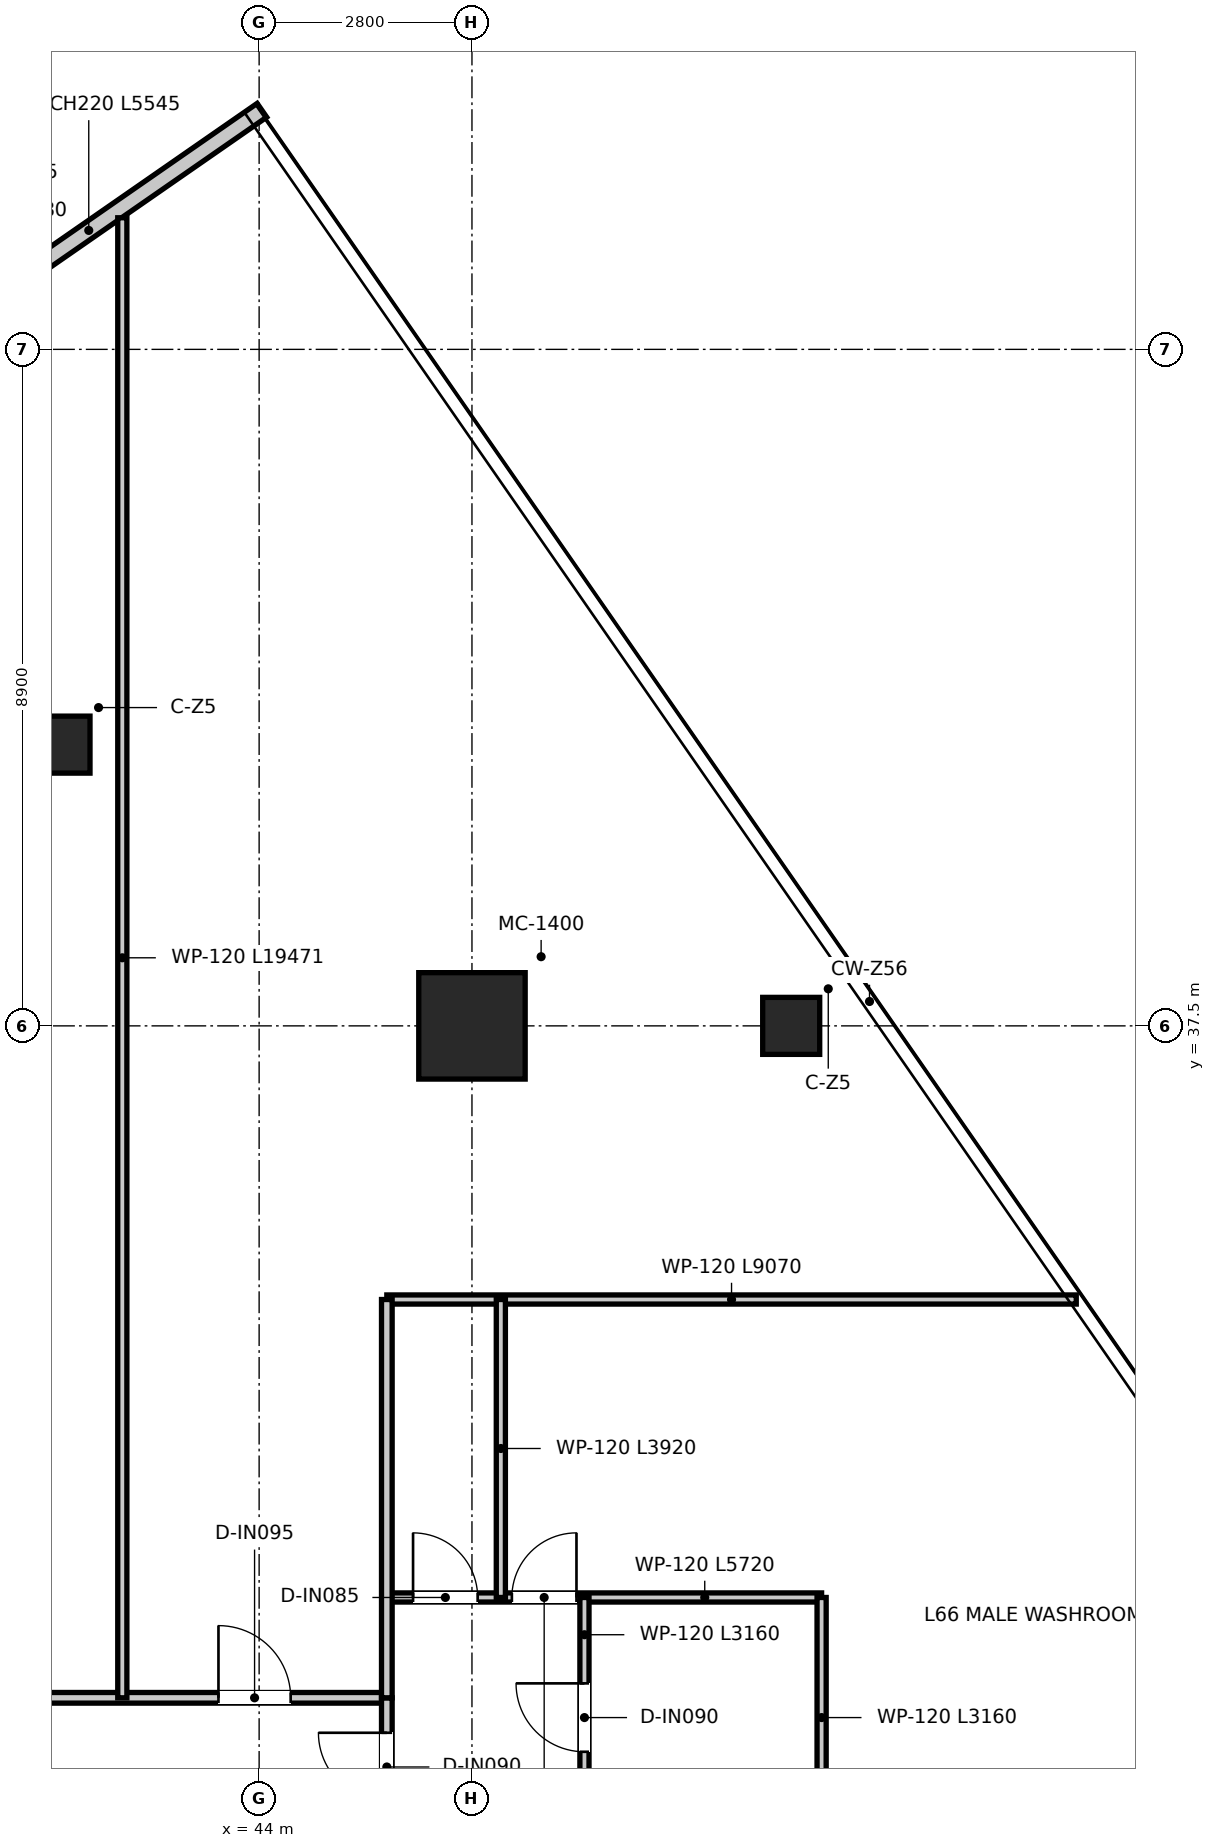
"""IFC4 building model, lengths in metres.
Left out: names, types, materials, properties, quantities, classifications, styles, units other than length and angle.
Written with IfcOpenShell. Run it as: python <this file> out.ifc"""

import sys

from ifc_helpers import new_model, si_unit, direction, frame, frame_2d, origin, origin_2d, place, context, subcontext, project, spatial, rectangle, extrude, source, transform, mapped, element, fill, save


model = new_model("IFC4")
c1 = context("Model", 3, precision=1e-05, world=origin(), true_north=direction((0.0, 1.0)))
c2 = subcontext(c1, "Body", "Model", "MODEL_VIEW")
j1 = project(units=[si_unit("LENGTHUNIT", "METRE"), si_unit("PLANEANGLEUNIT", "RADIAN")], contexts=[c1])
p1 = place(None, origin())
s1 = spatial("IfcSite", under=j1, at=p1, CompositionType="ELEMENT")
p2 = place(p1, origin())
s2 = spatial("IfcBuilding", under=s1, at=p2, CompositionType="ELEMENT")
p3 = place(p2, frame((0.0, 0.0, 271.35)))
s3 = spatial("IfcBuildingStorey", under=s2, at=p3, CompositionType="ELEMENT", Elevation=271.35)
m1 = source(origin(), c2, "Body", "SweptSolid", [
    extrude(rectangle(XDim=1.4, YDim=1.4, at=origin_2d()), origin(), (0.0, 0.0, 1.0), 3.95),
])
p4 = place(p3, frame((46.8, 37.5, 0.0), z_axis=(0.0, 0.0, 1.0), x_axis=(1.0, 0.0, 0.0)))
e1 = element("IfcColumn", 1, at=p4, inside=s3, PredefinedType="USERDEFINED", context=c2, shape_type="MappedRepresentation", body=[
    mapped(m1, transform((0.0, 0.0, 0.0), x_axis=(1.0, 0.0, 0.0), y_axis=(0.0, 1.0, 0.0), z_axis=(0.0, 0.0, 1.0), scale=1.0)),
])
m2 = source(origin(), c2, "Body", "SweptSolid", [
    extrude(rectangle(XDim=0.75, YDim=0.75, at=origin_2d()), origin(), (0.0, 0.0, 1.0), 3.95),
])
for number, where, z_axis, x_axis in (
    (2, (41.4, 41.2, 0.0), (0.0, 0.0, 1.0), (1.0, 0.0, 0.0)),
    (3, (51.0, 37.5, 0.0), (0.0, 0.0, 1.0), (1.0, 0.0, 0.0)),
):
    element("IfcColumn", number, at=place(p3, frame(where, z_axis=z_axis, x_axis=x_axis)), inside=s3, PredefinedType="COLUMN", context=c2, shape_type="MappedRepresentation", body=[
        mapped(m2, transform((0.0, 0.0, 0.0), x_axis=(1.0, 0.0, 0.0), y_axis=(0.0, 1.0, 0.0), z_axis=(0.0, 0.0, 1.0), scale=1.0)),
    ])
p5 = place(p3, frame((44.037, 49.545, 0.0), z_axis=(0.0, 0.0, 1.0), x_axis=(-0.821652918874, -0.569988141022, 0.0)))
e4 = element("IfcWall", 4, at=p5, inside=s3, PredefinedType="ELEMENTEDWALL", context=c2, shape_type="SweptSolid", body=[
    extrude(rectangle(XDim=5.545, YDim=0.22, at=frame_2d((2.772, 0.0))), origin(), (0.0, 0.0, 1.0), 3.67),
])
p6 = place(p3, frame((26.32, 28.66, 0.0), z_axis=(0.0, 0.0, 1.0), x_axis=(1.0, 0.0, 0.0)))
e5 = element("IfcWall", 5, at=p6, inside=s3, PredefinedType="PARTITIONING", context=c2, shape_type="SweptSolid", body=[
    extrude(rectangle(XDim=19.36, YDim=0.14, at=frame_2d((9.68, 0.0))), origin(), (0.0, 0.0, 1.0), 3.18),
])
p7 = place(p6, frame((1.265, 0.0, 0.0)))
e6 = element("IfcOpeningElement", 6, at=p7, cuts=e5, PredefinedType="OPENING", context=c2, shape_type="SweptSolid", body=[
    extrude(rectangle(XDim=0.95, YDim=2.1, at=frame_2d((0.475, 1.05))), frame((0.0, 0.08, 0.0), z_axis=(0.0, -1.0, 0.0), x_axis=(1.0, 0.0, 0.0)), (0.0, 0.0, 1.0), 0.16),
])
p8 = place(p6, frame((6.105, 0.0, 0.0)))
e7 = element("IfcOpeningElement", 7, at=p8, cuts=e5, PredefinedType="OPENING", context=c2, shape_type="SweptSolid", body=[
    extrude(rectangle(XDim=0.95, YDim=2.1, at=frame_2d((0.475, 1.05))), frame((0.0, 0.08, 0.0), z_axis=(0.0, -1.0, 0.0), x_axis=(1.0, 0.0, 0.0)), (0.0, 0.0, 1.0), 0.16),
])
p9 = place(p6, frame((12.305, 0.0, 0.0)))
e8 = element("IfcOpeningElement", 8, at=p9, cuts=e5, PredefinedType="OPENING", context=c2, shape_type="SweptSolid", body=[
    extrude(rectangle(XDim=0.95, YDim=2.1, at=frame_2d((0.475, 1.05))), frame((0.0, 0.08, 0.0), z_axis=(0.0, -1.0, 0.0), x_axis=(1.0, 0.0, 0.0)), (0.0, 0.0, 1.0), 0.16),
])
p10 = place(p6, frame((17.145, 0.0, 0.0)))
e9 = element("IfcOpeningElement", 9, at=p10, cuts=e5, PredefinedType="OPENING", context=c2, shape_type="SweptSolid", body=[
    extrude(rectangle(XDim=0.95, YDim=2.1, at=frame_2d((0.475, 1.05))), frame((0.0, 0.08, 0.0), z_axis=(0.0, -1.0, 0.0), x_axis=(1.0, 0.0, 0.0)), (0.0, 0.0, 1.0), 0.16),
])
p11 = place(p3, frame((45.68, 9.67, 0.0), z_axis=(0.0, 0.0, 1.0), x_axis=(0.0, 1.0, 0.0)))
e10 = element("IfcWall", 10, at=p11, inside=s3, PredefinedType="PARTITIONING", context=c2, shape_type="SweptSolid", body=[
    extrude(rectangle(XDim=18.99, YDim=0.14, at=frame_2d((9.495, 0.0))), origin(), (0.0, 0.0, 1.0), 3.13),
])
p12 = place(p11, frame((17.63, 0.0, 0.0)))
e11 = element("IfcOpeningElement", 11, at=p12, cuts=e10, PredefinedType="OPENING", context=c2, shape_type="SweptSolid", body=[
    extrude(rectangle(XDim=0.9, YDim=2.1, at=frame_2d((0.45, 1.05))), frame((0.0, 0.08, 0.0), z_axis=(0.0, -1.0, 0.0), x_axis=(1.0, 0.0, 0.0)), (0.0, 0.0, 1.0), 0.16),
])
p13 = place(p11, frame((1.13, 0.0, 0.0)))
e12 = element("IfcOpeningElement", 12, at=p13, cuts=e10, PredefinedType="OPENING", context=c2, shape_type="SweptSolid", body=[
    extrude(rectangle(XDim=0.9, YDim=2.1, at=frame_2d((0.45, 1.05))), frame((0.0, 0.08, 0.0), z_axis=(0.0, -1.0, 0.0), x_axis=(1.0, 0.0, 0.0)), (0.0, 0.0, 1.0), 0.16),
])
p14 = place(p11, frame((8.88, 0.0, 0.0)))
e13 = element("IfcOpeningElement", 13, at=p14, cuts=e10, PredefinedType="OPENING", context=c2, shape_type="SweptSolid", body=[
    extrude(rectangle(XDim=0.9, YDim=2.1, at=frame_2d((0.45, 1.05))), frame((0.0, 0.08, 0.0), z_axis=(0.0, -1.0, 0.0), x_axis=(1.0, 0.0, 0.0)), (0.0, 0.0, 1.0), 0.16),
])
p15 = place(p11, frame((13.54, 0.0, 0.0)))
e14 = element("IfcOpeningElement", 14, at=p15, cuts=e10, PredefinedType="OPENING", context=c2, shape_type="SweptSolid", body=[
    extrude(rectangle(XDim=0.9, YDim=2.1, at=frame_2d((0.45, 1.05))), frame((0.0, 0.08, 0.0), z_axis=(0.0, -1.0, 0.0), x_axis=(1.0, 0.0, 0.0)), (0.0, 0.0, 1.0), 0.16),
])
p16 = place(p3, frame((45.68, 33.9, 0.0), z_axis=(0.0, 0.0, 1.0), x_axis=(1.0, 0.0, 0.0)))
e15 = element("IfcWall", 15, at=p16, inside=s3, PredefinedType="PARTITIONING", context=c2, shape_type="SweptSolid", body=[
    extrude(rectangle(XDim=9.07, YDim=0.12, at=frame_2d((4.535, 0.0))), origin(), (0.0, 0.0, 1.0), 3.13),
])
p17 = place(p3, frame((45.68, 29.98, 0.0), z_axis=(0.0, 0.0, 1.0), x_axis=(1.0, 0.0, 0.0)))
e16 = element("IfcWall", 16, at=p17, inside=s3, PredefinedType="PARTITIONING", context=c2, shape_type="SweptSolid", body=[
    extrude(rectangle(XDim=5.72, YDim=0.12, at=frame_2d((2.86, 0.0))), origin(), (0.0, 0.0, 1.0), 3.13),
])
p18 = place(p17, frame((1.645, 0.0, 0.0)))
e17 = element("IfcOpeningElement", 17, at=p18, cuts=e16, PredefinedType="OPENING", context=c2, shape_type="SweptSolid", body=[
    extrude(rectangle(XDim=0.85, YDim=2.1, at=frame_2d((0.425, 1.05))), frame((0.0, 0.07, 0.0), z_axis=(0.0, -1.0, 0.0), x_axis=(1.0, 0.0, 0.0)), (0.0, 0.0, 1.0), 0.14),
])
p19 = place(p17, frame((0.345, 0.0, 0.0)))
e18 = element("IfcOpeningElement", 18, at=p19, cuts=e16, PredefinedType="OPENING", context=c2, shape_type="SweptSolid", body=[
    extrude(rectangle(XDim=0.85, YDim=2.1, at=frame_2d((0.425, 1.05))), frame((0.0, 0.07, 0.0), z_axis=(0.0, -1.0, 0.0), x_axis=(1.0, 0.0, 0.0)), (0.0, 0.0, 1.0), 0.14),
])
p20 = place(p3, frame((51.4, 26.82, 0.0), z_axis=(0.0, 0.0, 1.0), x_axis=(0.0, 1.0, 0.0)))
e19 = element("IfcWall", 19, at=p20, inside=s3, PredefinedType="PARTITIONING", context=c2, shape_type="SweptSolid", body=[
    extrude(rectangle(XDim=3.16, YDim=0.12, at=frame_2d((1.58, 0.0))), origin(), (0.0, 0.0, 1.0), 3.67),
])
p21 = place(p3, frame((48.28, 26.82, 0.0), z_axis=(0.0, 0.0, 1.0), x_axis=(0.0, 1.0, 0.0)))
e20 = element("IfcWall", 20, at=p21, inside=s3, PredefinedType="PARTITIONING", context=c2, shape_type="SweptSolid", body=[
    extrude(rectangle(XDim=3.16, YDim=0.12, at=frame_2d((1.58, 0.0))), origin(), (0.0, 0.0, 1.0), 3.18),
])
p22 = place(p21, frame((1.13, 0.0, 0.0)))
e21 = element("IfcOpeningElement", 21, at=p22, cuts=e20, PredefinedType="OPENING", context=c2, shape_type="SweptSolid", body=[
    extrude(rectangle(XDim=0.9, YDim=2.1, at=frame_2d((0.45, 1.05))), frame((0.0, 0.07, 0.0), z_axis=(0.0, -1.0, 0.0), x_axis=(1.0, 0.0, 0.0)), (0.0, 0.0, 1.0), 0.14),
])
p23 = place(p3, frame((47.18, 29.98, 0.0), z_axis=(0.0, 0.0, 1.0), x_axis=(0.0, 1.0, 0.0)))
e22 = element("IfcWall", 22, at=p23, inside=s3, PredefinedType="PARTITIONING", context=c2, shape_type="SweptSolid", body=[
    extrude(rectangle(XDim=3.92, YDim=0.12, at=frame_2d((1.96, 0.0))), origin(), (0.0, 0.0, 1.0), 3.31),
])
p24 = place(p3, frame((45.68, 28.66, 0.0), z_axis=(0.0, 0.0, 1.0), x_axis=(0.0, 1.0, 0.0)))
e23 = element("IfcWall", 23, at=p24, inside=s3, PredefinedType="PARTITIONING", context=c2, shape_type="SweptSolid", body=[
    extrude(rectangle(XDim=5.24, YDim=0.14, at=frame_2d((2.62, 0.0))), origin(), (0.0, 0.0, 1.0), 3.43),
])
p25 = place(p3, frame((42.2, 28.66, 0.0), z_axis=(0.0, 0.0, 1.0), x_axis=(0.0, 1.0, 0.0)))
e24 = element("IfcWall", 24, at=p25, inside=s3, PredefinedType="PARTITIONING", context=c2, shape_type="SweptSolid", body=[
    extrude(rectangle(XDim=19.471, YDim=0.12, at=frame_2d((9.736, 0.0))), origin(), (0.0, 0.0, 1.0), 3.13),
])
p26 = place(p12, origin())
e25 = element("IfcDoor", 25, at=p26, inside=s3, OperationType="SINGLE_SWING_RIGHT", PredefinedType="DOOR", context=c2, shape_type="SweptSolid", body=[
    extrude(rectangle(XDim=0.9, YDim=2.1, at=frame_2d((0.45, 1.05))), frame((0.0, 0.025, 0.0), z_axis=(0.0, -1.0, 0.0), x_axis=(1.0, 0.0, 0.0)), (0.0, 0.0, 1.0), 0.05),
])
fill(e11, e25)
p27 = place(p18, origin())
e26 = element("IfcDoor", 26, at=p27, inside=s3, OperationType="SINGLE_SWING_RIGHT", PredefinedType="DOOR", context=c2, shape_type="SweptSolid", body=[
    extrude(rectangle(XDim=0.85, YDim=2.1, at=frame_2d((0.425, 1.05))), frame((0.0, 0.025, 0.0), z_axis=(0.0, -1.0, 0.0), x_axis=(1.0, 0.0, 0.0)), (0.0, 0.0, 1.0), 0.05),
])
fill(e17, e26)
p28 = place(p19, origin())
e27 = element("IfcDoor", 27, at=p28, inside=s3, OperationType="SINGLE_SWING_LEFT", PredefinedType="DOOR", context=c2, shape_type="SweptSolid", body=[
    extrude(rectangle(XDim=0.85, YDim=2.1, at=frame_2d((0.425, 1.05))), frame((0.0, 0.025, 0.0), z_axis=(0.0, -1.0, 0.0), x_axis=(1.0, 0.0, 0.0)), (0.0, 0.0, 1.0), 0.05),
])
fill(e18, e27)
p29 = place(p22, origin())
e28 = element("IfcDoor", 28, at=p29, inside=s3, OperationType="SINGLE_SWING_RIGHT", PredefinedType="DOOR", context=c2, shape_type="SweptSolid", body=[
    extrude(rectangle(XDim=0.9, YDim=2.1, at=frame_2d((0.45, 1.05))), frame((0.0, 0.025, 0.0), z_axis=(0.0, -1.0, 0.0), x_axis=(1.0, 0.0, 0.0)), (0.0, 0.0, 1.0), 0.05),
])
fill(e21, e28)
p30 = place(p10, origin())
e29 = element("IfcDoor", 29, at=p30, inside=s3, OperationType="SINGLE_SWING_LEFT", PredefinedType="DOOR", context=c2, shape_type="SweptSolid", body=[
    extrude(rectangle(XDim=0.95, YDim=2.1, at=frame_2d((0.475, 1.05))), frame((0.0, 0.025, 0.0), z_axis=(0.0, -1.0, 0.0), x_axis=(1.0, 0.0, 0.0)), (0.0, 0.0, 1.0), 0.05),
])
fill(e9, e29)
save(model, sys.argv[1])
